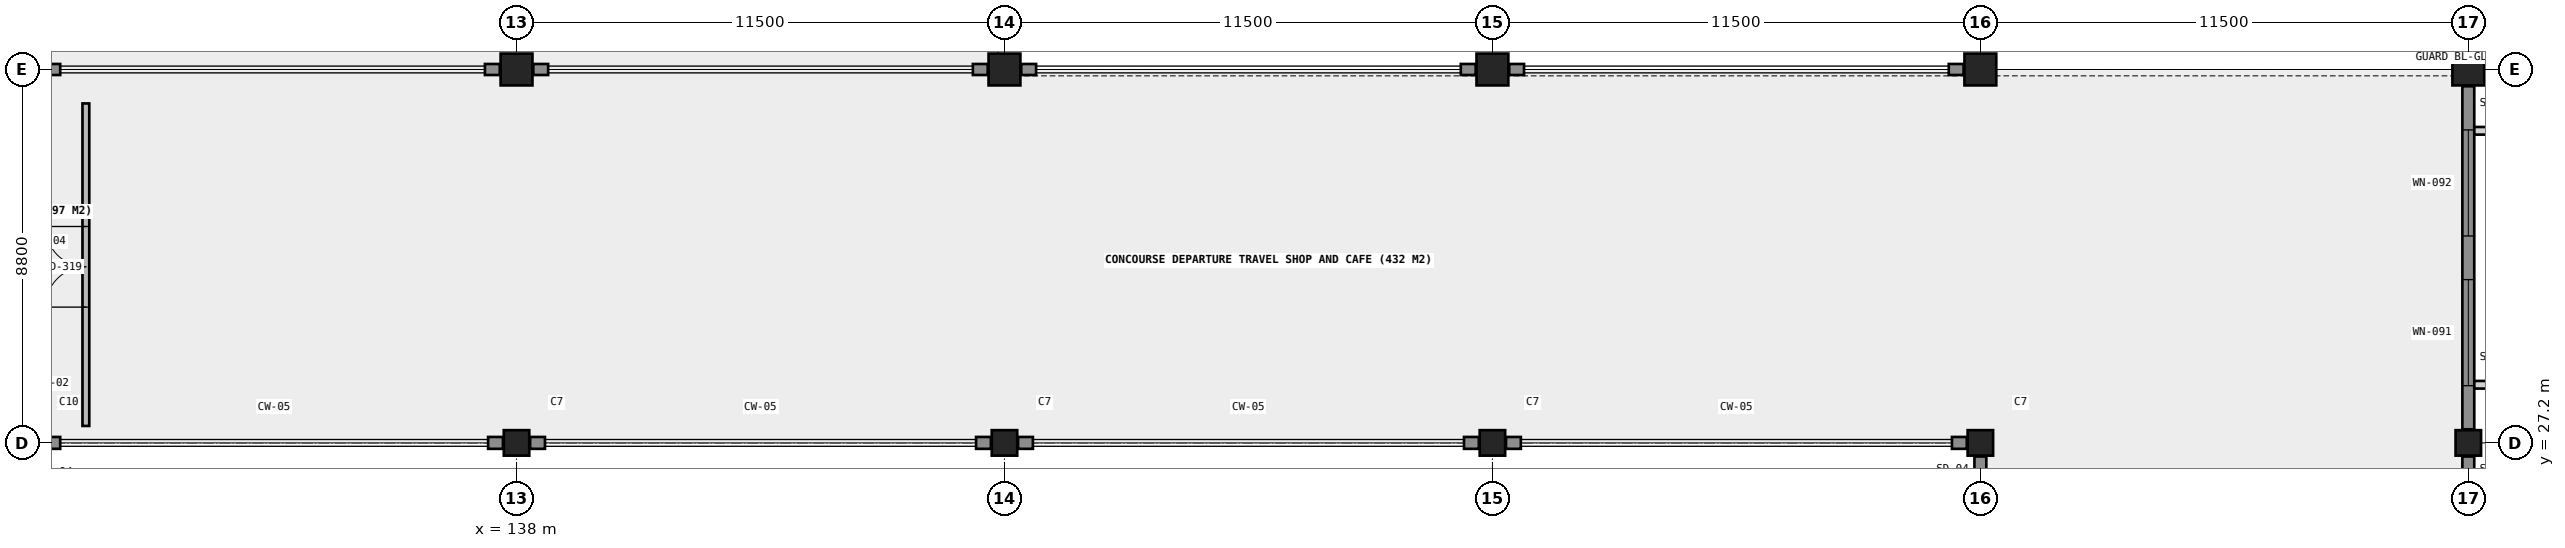
"""IFC4 building model, lengths in metres.
Left out: names, types, materials, properties, quantities, classifications, styles, units other than length and angle.
Written with IfcOpenShell. Run it as: python <this file> out.ifc"""

import sys

from ifc_helpers import new_model, si_unit, direction, frame, frame_2d, origin, origin_2d, place, context, subcontext, project, spatial, rectangle, extrude, element, fill, save


model = new_model("IFC4")
c1 = context("Model", 3, precision=1e-05, world=origin(), true_north=direction((0.0, 1.0)))
c2 = subcontext(c1, "Body", "Model", "MODEL_VIEW")
j1 = project(units=[si_unit("LENGTHUNIT", "METRE"), si_unit("PLANEANGLEUNIT", "RADIAN")], contexts=[c1])
p1 = place(None, origin())
s1 = spatial("IfcSite", under=j1, at=p1, CompositionType="ELEMENT")
p2 = place(p1, origin())
s2 = spatial("IfcBuilding", under=s1, at=p2, CompositionType="ELEMENT")
p3 = place(p2, frame((0.0, 0.0, 8.4)))
s3 = spatial("IfcBuildingStorey", under=s2, at=p3, CompositionType="ELEMENT", Elevation=8.4)
p4 = place(p3, frame((138.0, 27.2, 0.0), z_axis=(0.0, 0.0, 1.0), x_axis=(1.0, 0.0, 0.0)))
e1 = element("IfcColumn", 1, at=p4, inside=s3, PredefinedType="COLUMN", context=c2, shape_type="SweptSolid", body=[
    extrude(rectangle(XDim=0.6, YDim=0.6, at=origin_2d()), origin(), (0.0, 0.0, 1.0), 5.4),
])
p5 = place(p3, frame((138.0, 36.0, 0.0), z_axis=(0.0, 0.0, 1.0), x_axis=(1.0, 0.0, 0.0)))
e2 = element("IfcColumn", 2, at=p5, inside=s3, PredefinedType="COLUMN", context=c2, shape_type="SweptSolid", body=[
    extrude(rectangle(XDim=0.75, YDim=0.75, at=origin_2d()), origin(), (0.0, 0.0, 1.0), 5.4),
])
p6 = place(p3, frame((149.5, 27.2, 0.0), z_axis=(0.0, 0.0, 1.0), x_axis=(1.0, 0.0, 0.0)))
e3 = element("IfcColumn", 3, at=p6, inside=s3, PredefinedType="COLUMN", context=c2, shape_type="SweptSolid", body=[
    extrude(rectangle(XDim=0.6, YDim=0.6, at=origin_2d()), origin(), (0.0, 0.0, 1.0), 5.4),
])
p7 = place(p3, frame((149.5, 36.0, 0.0), z_axis=(0.0, 0.0, 1.0), x_axis=(1.0, 0.0, 0.0)))
e4 = element("IfcColumn", 4, at=p7, inside=s3, PredefinedType="COLUMN", context=c2, shape_type="SweptSolid", body=[
    extrude(rectangle(XDim=0.75, YDim=0.75, at=origin_2d()), origin(), (0.0, 0.0, 1.0), 5.4),
])
p8 = place(p3, frame((161.0, 27.2, 0.0), z_axis=(0.0, 0.0, 1.0), x_axis=(1.0, 0.0, 0.0)))
e5 = element("IfcColumn", 5, at=p8, inside=s3, PredefinedType="COLUMN", context=c2, shape_type="SweptSolid", body=[
    extrude(rectangle(XDim=0.6, YDim=0.6, at=origin_2d()), origin(), (0.0, 0.0, 1.0), 5.4),
])
p9 = place(p3, frame((161.0, 36.0, 0.0), z_axis=(0.0, 0.0, 1.0), x_axis=(1.0, 0.0, 0.0)))
e6 = element("IfcColumn", 6, at=p9, inside=s3, PredefinedType="COLUMN", context=c2, shape_type="SweptSolid", body=[
    extrude(rectangle(XDim=0.75, YDim=0.75, at=origin_2d()), origin(), (0.0, 0.0, 1.0), 5.4),
])
p10 = place(p3, frame((172.5, 27.2, 0.0), z_axis=(0.0, 0.0, 1.0), x_axis=(1.0, 0.0, 0.0)))
e7 = element("IfcColumn", 7, at=p10, inside=s3, PredefinedType="COLUMN", context=c2, shape_type="SweptSolid", body=[
    extrude(rectangle(XDim=0.6, YDim=0.6, at=origin_2d()), origin(), (0.0, 0.0, 1.0), 5.4),
])
p11 = place(p3, frame((172.5, 36.0, 0.0), z_axis=(0.0, 0.0, 1.0), x_axis=(1.0, 0.0, 0.0)))
e8 = element("IfcColumn", 8, at=p11, inside=s3, PredefinedType="COLUMN", context=c2, shape_type="SweptSolid", body=[
    extrude(rectangle(XDim=0.75, YDim=0.75, at=origin_2d()), origin(), (0.0, 0.0, 1.0), 5.4),
])
p12 = place(p3, frame((184.0, 27.2, 0.0), z_axis=(0.0, 0.0, 1.0), x_axis=(1.0, 0.0, 0.0)))
e9 = element("IfcColumn", 9, at=p12, inside=s3, PredefinedType="COLUMN", context=c2, shape_type="SweptSolid", body=[
    extrude(rectangle(XDim=0.6, YDim=0.6, at=origin_2d()), origin(), (0.0, 0.0, 1.0), 5.4),
])
p13 = place(p3, frame((184.0, 36.0, 0.0), z_axis=(0.0, 0.0, 1.0), x_axis=(1.0, 0.0, 0.0)))
e10 = element("IfcColumn", 10, at=p13, inside=s3, PredefinedType="COLUMN", context=c2, shape_type="SweptSolid", body=[
    extrude(rectangle(XDim=0.75, YDim=0.75, at=origin_2d()), origin(), (0.0, 0.0, 1.0), 5.4),
])
p14 = place(p3, frame((126.895, 27.2, 0.0), z_axis=(0.0, 0.0, 1.0), x_axis=(1.0, 0.0, 0.0)))
e11 = element("IfcWall", 11, at=p14, inside=s3, PredefinedType="SOLIDWALL", context=c2, shape_type="SweptSolid", body=[
    extrude(rectangle(XDim=0.35, YDim=0.28, at=frame_2d((0.175, 0.0))), origin(), (0.0, 0.0, 1.0), 5.14),
])
for number, where, z_axis, x_axis in (
    (12, (137.33, 27.2, 0.0), (0.0, 0.0, 1.0), (1.0, 0.0, 0.0)),
    (13, (138.32, 27.2, 0.0), (0.0, 0.0, 1.0), (1.0, 0.0, 0.0)),
    (14, (148.83, 27.2, 0.0), (0.0, 0.0, 1.0), (1.0, 0.0, 0.0)),
    (15, (149.82, 27.2, 0.0), (0.0, 0.0, 1.0), (1.0, 0.0, 0.0)),
    (16, (160.33, 27.2, 0.0), (0.0, 0.0, 1.0), (1.0, 0.0, 0.0)),
    (17, (161.32, 27.2, 0.0), (0.0, 0.0, 1.0), (1.0, 0.0, 0.0)),
    (18, (171.83, 27.2, 0.0), (0.0, 0.0, 1.0), (1.0, 0.0, 0.0)),
):
    element("IfcWall", number, at=place(p3, frame(where, z_axis=z_axis, x_axis=x_axis)), inside=s3, PredefinedType="SOLIDWALL", context=c2, shape_type="SweptSolid", body=[
        extrude(rectangle(XDim=0.35, YDim=0.28, at=frame_2d((0.175, 0.0))), origin(), (0.0, 0.0, 1.0), 5.14),
    ])
p15 = place(p3, frame((172.5, 17.92, 0.0), z_axis=(0.0, 0.0, 1.0), x_axis=(0.0, 1.0, 0.0)))
e19 = element("IfcWall", 19, at=p15, inside=s3, PredefinedType="SOLIDWALL", context=c2, shape_type="SweptSolid", body=[
    extrude(rectangle(XDim=8.96, YDim=0.28, at=frame_2d((4.48, 0.0))), origin(), (0.0, 0.0, 1.0), 4.25),
])
p16 = place(p15, frame((2.287, 0.0, 0.85)))
e20 = element("IfcOpeningElement", 20, at=p16, cuts=e19, PredefinedType="OPENING", context=c2, shape_type="SweptSolid", body=[
    extrude(rectangle(XDim=1.05, YDim=2.05, at=frame_2d((0.525, 1.025))), frame((0.0, 0.15, 0.0), z_axis=(0.0, -1.0, 0.0), x_axis=(1.0, 0.0, 0.0)), (0.0, 0.0, 1.0), 0.3),
])
p17 = place(p15, frame((5.623, 0.0, 0.85)))
e21 = element("IfcOpeningElement", 21, at=p17, cuts=e19, PredefinedType="OPENING", context=c2, shape_type="SweptSolid", body=[
    extrude(rectangle(XDim=1.05, YDim=2.05, at=frame_2d((0.525, 1.025))), frame((0.0, 0.15, 0.0), z_axis=(0.0, -1.0, 0.0), x_axis=(1.0, 0.0, 0.0)), (0.0, 0.0, 1.0), 0.3),
])
p18 = place(p3, frame((184.0, 17.92, 0.0), z_axis=(0.0, 0.0, 1.0), x_axis=(0.0, 1.0, 0.0)))
e22 = element("IfcWall", 22, at=p18, inside=s3, PredefinedType="SOLIDWALL", context=c2, shape_type="SweptSolid", body=[
    extrude(rectangle(XDim=8.96, YDim=0.28, at=frame_2d((4.48, 0.0))), origin(), (0.0, 0.0, 1.0), 4.45),
])
p19 = place(p18, frame((1.32, 0.0, 0.85)))
e23 = element("IfcOpeningElement", 23, at=p19, cuts=e22, PredefinedType="OPENING", context=c2, shape_type="SweptSolid", body=[
    extrude(rectangle(XDim=2.5, YDim=2.2, at=frame_2d((1.25, 1.1))), frame((0.0, 0.15, 0.0), z_axis=(0.0, -1.0, 0.0), x_axis=(1.0, 0.0, 0.0)), (0.0, 0.0, 1.0), 0.3),
])
p20 = place(p18, frame((5.14, 0.0, 0.85)))
e24 = element("IfcOpeningElement", 24, at=p20, cuts=e22, PredefinedType="OPENING", context=c2, shape_type="SweptSolid", body=[
    extrude(rectangle(XDim=2.5, YDim=2.2, at=frame_2d((1.25, 1.1))), frame((0.0, 0.15, 0.0), z_axis=(0.0, -1.0, 0.0), x_axis=(1.0, 0.0, 0.0)), (0.0, 0.0, 1.0), 0.3),
])
p21 = place(p3, frame((184.0, 27.52, 0.0), z_axis=(0.0, 0.0, 1.0), x_axis=(0.0, 1.0, 0.0)))
e25 = element("IfcWall", 25, at=p21, inside=s3, PredefinedType="SOLIDWALL", context=c2, shape_type="SweptSolid", body=[
    extrude(rectangle(XDim=8.085, YDim=0.28, at=frame_2d((4.042, 0.0))), origin(), (0.0, 0.0, 1.0), 4.45),
])
p22 = place(p21, frame((1.028, 0.0, 0.85)))
e26 = element("IfcOpeningElement", 26, at=p22, cuts=e25, PredefinedType="OPENING", context=c2, shape_type="SweptSolid", body=[
    extrude(rectangle(XDim=2.5, YDim=2.2, at=frame_2d((1.25, 1.1))), frame((0.0, 0.15, 0.0), z_axis=(0.0, -1.0, 0.0), x_axis=(1.0, 0.0, 0.0)), (0.0, 0.0, 1.0), 0.3),
])
p23 = place(p21, frame((4.557, 0.0, 0.85)))
e27 = element("IfcOpeningElement", 27, at=p23, cuts=e25, PredefinedType="OPENING", context=c2, shape_type="SweptSolid", body=[
    extrude(rectangle(XDim=2.5, YDim=2.2, at=frame_2d((1.25, 1.1))), frame((0.0, 0.15, 0.0), z_axis=(0.0, -1.0, 0.0), x_axis=(1.0, 0.0, 0.0)), (0.0, 0.0, 1.0), 0.3),
])
for number, where, z_axis, x_axis in (
    (28, (126.895, 36.0, 0.0), (0.0, 0.0, 1.0), (1.0, 0.0, 0.0)),
    (29, (137.255, 36.0, 0.0), (0.0, 0.0, 1.0), (1.0, 0.0, 0.0)),
    (30, (138.395, 36.0, 0.0), (0.0, 0.0, 1.0), (1.0, 0.0, 0.0)),
    (31, (148.755, 36.0, 0.0), (0.0, 0.0, 1.0), (1.0, 0.0, 0.0)),
    (32, (149.895, 36.0, 0.0), (0.0, 0.0, 1.0), (1.0, 0.0, 0.0)),
    (33, (160.255, 36.0, 0.0), (0.0, 0.0, 1.0), (1.0, 0.0, 0.0)),
    (34, (161.395, 36.0, 0.0), (0.0, 0.0, 1.0), (1.0, 0.0, 0.0)),
    (35, (171.755, 36.0, 0.0), (0.0, 0.0, 1.0), (1.0, 0.0, 0.0)),
):
    element("IfcWall", number, at=place(p3, frame(where, z_axis=z_axis, x_axis=x_axis)), inside=s3, PredefinedType="SOLIDWALL", context=c2, shape_type="SweptSolid", body=[
        extrude(rectangle(XDim=0.35, YDim=0.26, at=frame_2d((0.175, 0.0))), origin(), (0.0, 0.0, 1.0), 5.1),
    ])
p24 = place(p3, frame((127.85, 27.6, 0.0), z_axis=(0.0, 0.0, 1.0), x_axis=(0.0, 1.0, 0.0)))
e36 = element("IfcWall", 36, at=p24, inside=s3, PredefinedType="PARTITIONING", context=c2, shape_type="SweptSolid", body=[
    extrude(rectangle(XDim=7.6, YDim=0.16, at=frame_2d((3.8, 0.0))), origin(), (0.0, 0.0, 1.0), 4.98),
])
p25 = place(p24, frame((2.8, 0.0, 0.0)))
e37 = element("IfcOpeningElement", 37, at=p25, cuts=e36, PredefinedType="OPENING", context=c2, shape_type="SweptSolid", body=[
    extrude(rectangle(XDim=1.9, YDim=2.35, at=frame_2d((0.95, 1.175))), frame((0.0, 0.09, 0.0), z_axis=(0.0, -1.0, 0.0), x_axis=(1.0, 0.0, 0.0)), (0.0, 0.0, 1.0), 0.18),
])
p26 = place(p22, origin())
e38 = element("IfcWindow", 38, at=p26, inside=s3, PartitioningType="SINGLE_PANEL", PredefinedType="WINDOW", context=c2, shape_type="SweptSolid", body=[
    extrude(rectangle(XDim=2.5, YDim=2.2, at=frame_2d((1.25, 1.1))), frame((0.0, 0.03, 0.0), z_axis=(0.0, -1.0, 0.0), x_axis=(1.0, 0.0, 0.0)), (0.0, 0.0, 1.0), 0.06),
])
fill(e26, e38)
p27 = place(p23, origin())
e39 = element("IfcWindow", 39, at=p27, inside=s3, PartitioningType="SINGLE_PANEL", PredefinedType="WINDOW", context=c2, shape_type="SweptSolid", body=[
    extrude(rectangle(XDim=2.5, YDim=2.2, at=frame_2d((1.25, 1.1))), frame((0.0, 0.03, 0.0), z_axis=(0.0, -1.0, 0.0), x_axis=(1.0, 0.0, 0.0)), (0.0, 0.0, 1.0), 0.06),
])
fill(e27, e39)
p28 = place(p25, origin())
e40 = element("IfcDoor", 40, at=p28, inside=s3, OperationType="DOUBLE_DOOR_SINGLE_SWING", PredefinedType="DOOR", context=c2, shape_type="SweptSolid", body=[
    extrude(rectangle(XDim=1.9, YDim=2.35, at=frame_2d((0.95, 1.175))), frame((0.0, 0.025, 0.0), z_axis=(0.0, -1.0, 0.0), x_axis=(1.0, 0.0, 0.0)), (0.0, 0.0, 1.0), 0.05),
])
fill(e37, e40)
save(model, sys.argv[1])
